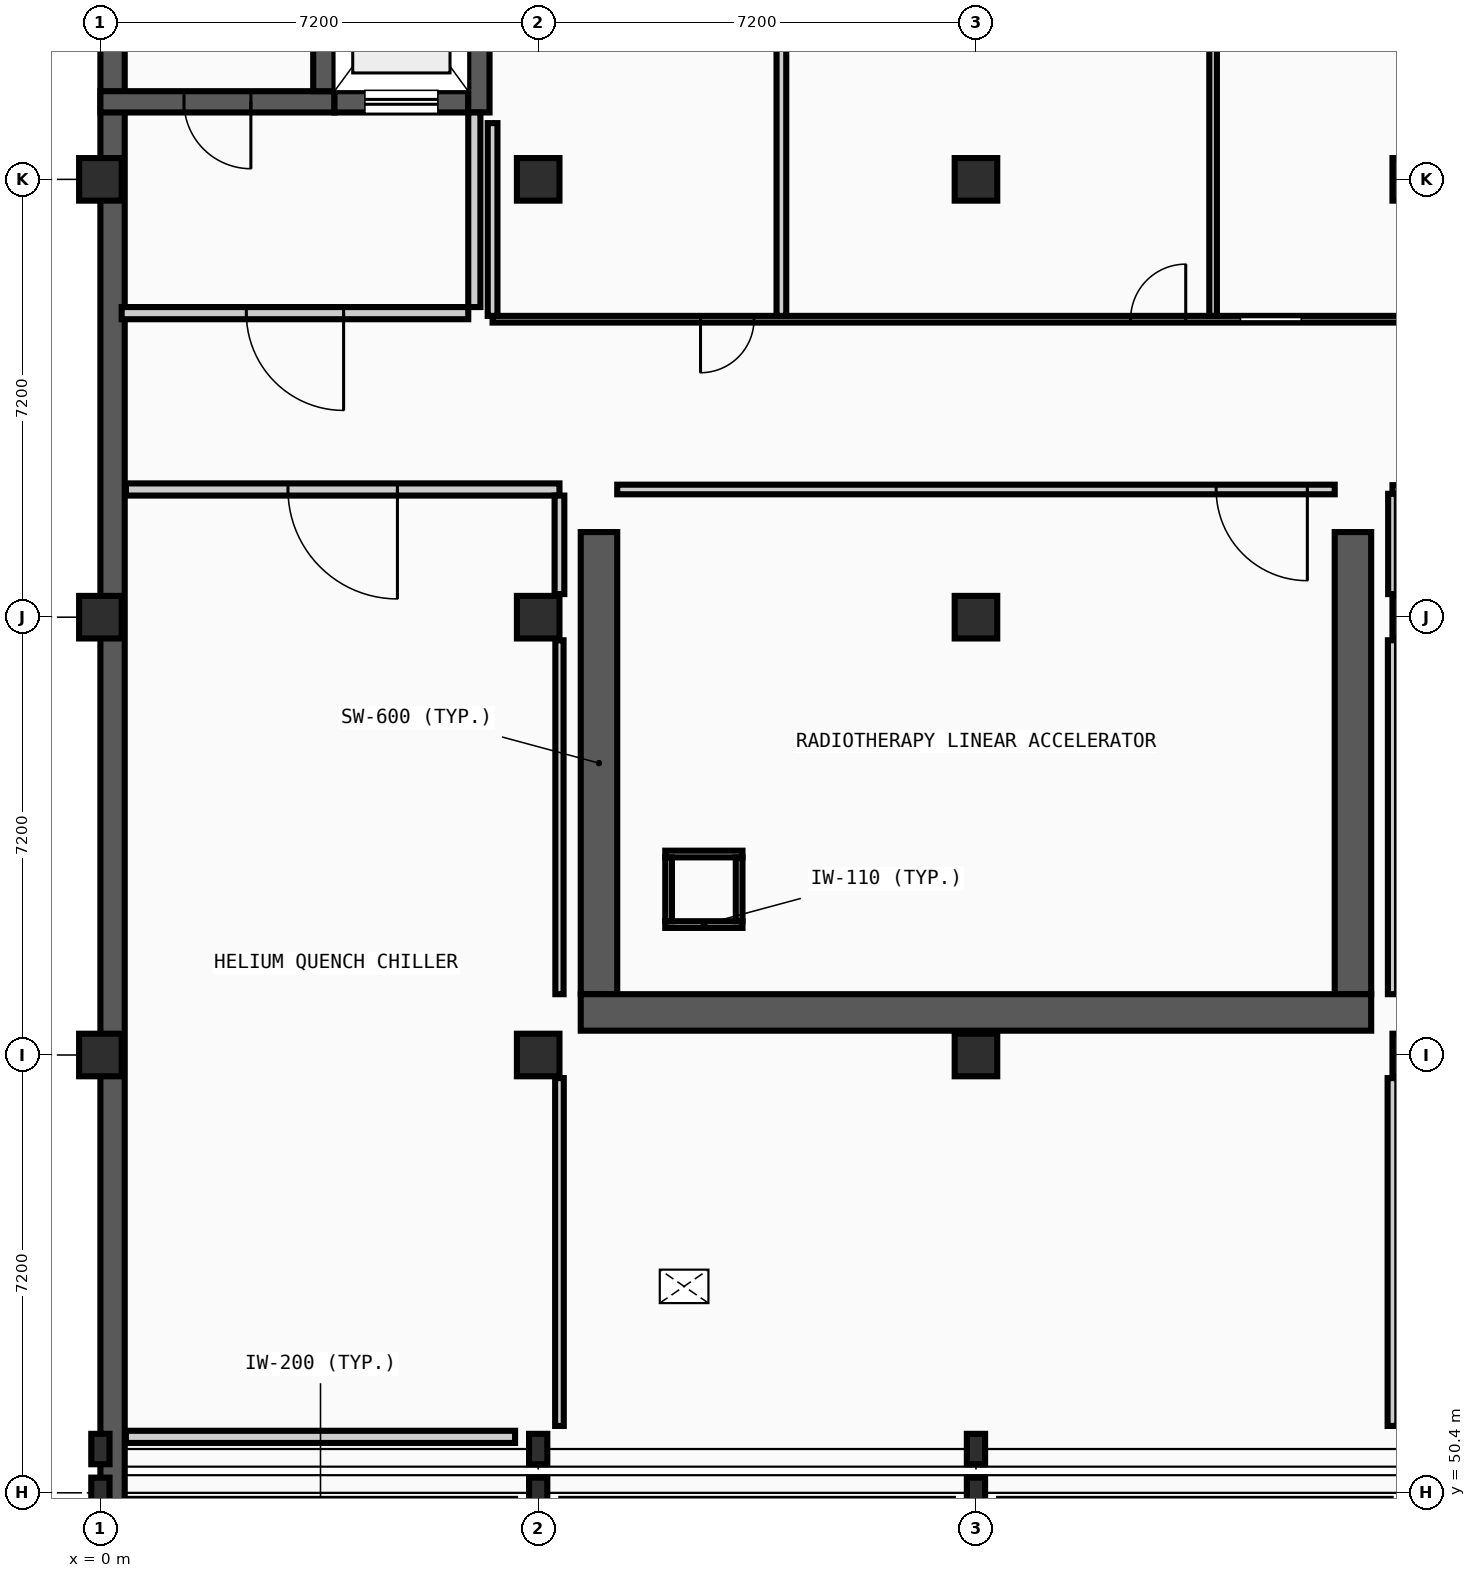
"""IFC4 building model, lengths in metres.
Left out: names, types, materials, properties, quantities, classifications, styles, units other than length and angle.
Written with IfcOpenShell. Run it as: python <this file> out.ifc"""

import sys

from ifc_helpers import new_model, si_unit, direction, frame, frame_2d, origin, origin_2d, place, context, subcontext, project, spatial, rectangle, i_section, extrude, element, fill, save


model = new_model("IFC4")
c1 = context("Model", 3, precision=1e-05, world=origin(), true_north=direction((0.0, 1.0)))
c2 = subcontext(c1, "Body", "Model", "MODEL_VIEW")
j1 = project(units=[si_unit("LENGTHUNIT", "METRE"), si_unit("PLANEANGLEUNIT", "RADIAN")], contexts=[c1])
p1 = place(None, origin())
s1 = spatial("IfcSite", under=j1, at=p1, CompositionType="ELEMENT")
p2 = place(p1, origin())
s2 = spatial("IfcBuilding", under=s1, at=p2, CompositionType="ELEMENT")
p3 = place(p2, frame((0.0, 0.0, -4.8)))
s3 = spatial("IfcBuildingStorey", under=s2, at=p3, CompositionType="ELEMENT", Elevation=-4.8)
for number, where, z_axis, x_axis in (
    (1, (0.0, 50.4, 0.0), (0.0, 0.0, 1.0), (1.0, 0.0, 0.0)),
    (2, (0.0, 51.12, 0.0), (0.0, 0.0, 1.0), (1.0, 0.0, 0.0)),
):
    element("IfcColumn", number, at=place(p3, frame(where, z_axis=z_axis, x_axis=x_axis)), inside=s3, PredefinedType="COLUMN", context=c2, shape_type="SweptSolid", body=[
        extrude(i_section(OverallWidth=0.3, OverallDepth=0.5, WebThickness=0.014, FlangeThickness=0.028, FilletRadius=0.027, at=origin_2d()), origin(), (0.0, 0.0, 1.0), 4.8),
    ])
for number, where, z_axis, x_axis in (
    (3, (0.0, 57.6, 0.0), (0.0, 0.0, 1.0), (1.0, 0.0, 0.0)),
    (4, (0.0, 64.8, 0.0), (0.0, 0.0, 1.0), (1.0, 0.0, 0.0)),
    (5, (0.0, 72.0, 0.0), (0.0, 0.0, 1.0), (1.0, 0.0, 0.0)),
):
    element("IfcColumn", number, at=place(p3, frame(where, z_axis=z_axis, x_axis=x_axis)), inside=s3, PredefinedType="COLUMN", context=c2, shape_type="SweptSolid", body=[
        extrude(rectangle(XDim=0.7, YDim=0.7, at=origin_2d()), origin(), (0.0, 0.0, 1.0), 4.8),
    ])
for number, where, z_axis, x_axis in (
    (6, (7.2, 50.4, 0.0), (0.0, 0.0, 1.0), (1.0, 0.0, 0.0)),
    (7, (7.2, 51.12, 0.0), (0.0, 0.0, 1.0), (1.0, 0.0, 0.0)),
):
    element("IfcColumn", number, at=place(p3, frame(where, z_axis=z_axis, x_axis=x_axis)), inside=s3, PredefinedType="COLUMN", context=c2, shape_type="SweptSolid", body=[
        extrude(i_section(OverallWidth=0.3, OverallDepth=0.5, WebThickness=0.014, FlangeThickness=0.028, FilletRadius=0.027, at=origin_2d()), origin(), (0.0, 0.0, 1.0), 4.8),
    ])
for number, where, z_axis, x_axis in (
    (8, (7.2, 57.6, 0.0), (0.0, 0.0, 1.0), (1.0, 0.0, 0.0)),
    (9, (7.2, 64.8, 0.0), (0.0, 0.0, 1.0), (1.0, 0.0, 0.0)),
    (10, (7.2, 72.0, 0.0), (0.0, 0.0, 1.0), (1.0, 0.0, 0.0)),
):
    element("IfcColumn", number, at=place(p3, frame(where, z_axis=z_axis, x_axis=x_axis)), inside=s3, PredefinedType="COLUMN", context=c2, shape_type="SweptSolid", body=[
        extrude(rectangle(XDim=0.7, YDim=0.7, at=origin_2d()), origin(), (0.0, 0.0, 1.0), 4.8),
    ])
for number, where, z_axis, x_axis in (
    (11, (14.4, 50.4, 0.0), (0.0, 0.0, 1.0), (1.0, 0.0, 0.0)),
    (12, (14.4, 51.12, 0.0), (0.0, 0.0, 1.0), (1.0, 0.0, 0.0)),
):
    element("IfcColumn", number, at=place(p3, frame(where, z_axis=z_axis, x_axis=x_axis)), inside=s3, PredefinedType="COLUMN", context=c2, shape_type="SweptSolid", body=[
        extrude(i_section(OverallWidth=0.3, OverallDepth=0.5, WebThickness=0.014, FlangeThickness=0.028, FilletRadius=0.027, at=origin_2d()), origin(), (0.0, 0.0, 1.0), 4.8),
    ])
for number, where, z_axis, x_axis in (
    (13, (14.4, 57.6, 0.0), (0.0, 0.0, 1.0), (1.0, 0.0, 0.0)),
    (14, (14.4, 64.8, 0.0), (0.0, 0.0, 1.0), (1.0, 0.0, 0.0)),
    (15, (14.4, 72.0, 0.0), (0.0, 0.0, 1.0), (1.0, 0.0, 0.0)),
    (16, (21.6, 57.6, 0.0), (0.0, 0.0, 1.0), (1.0, 0.0, 0.0)),
    (17, (21.6, 64.8, 0.0), (0.0, 0.0, 1.0), (1.0, 0.0, 0.0)),
    (18, (21.6, 72.0, 0.0), (0.0, 0.0, 1.0), (1.0, 0.0, 0.0)),
):
    element("IfcColumn", number, at=place(p3, frame(where, z_axis=z_axis, x_axis=x_axis)), inside=s3, PredefinedType="COLUMN", context=c2, shape_type="SweptSolid", body=[
        extrude(rectangle(XDim=0.7, YDim=0.7, at=origin_2d()), origin(), (0.0, 0.0, 1.0), 4.8),
    ])
p4 = place(p3, frame((0.2, 81.6, 0.0), z_axis=(0.0, 0.0, 1.0), x_axis=(0.0, -1.0, 0.0)))
e19 = element("IfcWall", 19, at=p4, inside=s3, PredefinedType="USERDEFINED", context=c2, shape_type="SweptSolid", body=[
    extrude(rectangle(XDim=81.2, YDim=0.4, at=frame_2d((40.6, 0.0))), origin(), (0.0, 0.0, 1.0), 4.545),
])
for number, where, z_axis, x_axis in (
    (20, (8.2, 58.6, 0.0), (0.0, 0.0, 1.0), (0.0, 1.0, 0.0)),
    (21, (20.6, 58.6, 0.0), (0.0, 0.0, 1.0), (0.0, 1.0, 0.0)),
):
    element("IfcWall", number, at=place(p3, frame(where, z_axis=z_axis, x_axis=x_axis)), inside=s3, PredefinedType="SHEAR", context=c2, shape_type="SweptSolid", body=[
        extrude(rectangle(XDim=7.6, YDim=0.6, at=frame_2d((3.8, 0.0))), origin(), (0.0, 0.0, 1.0), 4.5),
    ])
p5 = place(p3, frame((7.9, 58.3, 0.0), z_axis=(0.0, 0.0, 1.0), x_axis=(1.0, 0.0, 0.0)))
e22 = element("IfcWall", 22, at=p5, inside=s3, PredefinedType="SHEAR", context=c2, shape_type="SweptSolid", body=[
    extrude(rectangle(XDim=13.0, YDim=0.6, at=frame_2d((6.5, 0.0))), origin(), (0.0, 0.0, 1.0), 4.5),
])
p6 = place(p3, frame((0.0, 73.275, 0.0), z_axis=(0.0, 0.0, 1.0), x_axis=(1.0, 0.0, 0.0)))
e23 = element("IfcWall", 23, at=p6, inside=s3, PredefinedType="SHEAR", context=c2, shape_type="SweptSolid", body=[
    extrude(rectangle(XDim=3.85, YDim=0.35, at=frame_2d((1.925, 0.0))), origin(), (0.0, 0.0, 1.0), 4.545),
])
p7 = place(p6, frame((1.375, 0.0, 0.0)))
e24 = element("IfcOpeningElement", 24, at=p7, cuts=e23, PredefinedType="OPENING", context=c2, shape_type="SweptSolid", body=[
    extrude(rectangle(XDim=1.1, YDim=2.15, at=frame_2d((0.55, 1.075))), frame((0.0, 0.185, 0.0), z_axis=(0.0, -1.0, 0.0), x_axis=(1.0, 0.0, 0.0)), (0.0, 0.0, 1.0), 0.37),
])
p8 = place(p3, frame((3.675, 73.45, 0.0), z_axis=(0.0, 0.0, 1.0), x_axis=(0.0, 1.0, 0.0)))
e25 = element("IfcWall", 25, at=p8, inside=s3, PredefinedType="SHEAR", context=c2, shape_type="SweptSolid", body=[
    extrude(rectangle(XDim=7.8, YDim=0.35, at=frame_2d((3.9, 0.0))), origin(), (0.0, 0.0, 1.0), 4.545),
])
p9 = place(p3, frame((3.85, 73.275, 0.0), z_axis=(0.0, 0.0, 1.0), x_axis=(1.0, 0.0, 0.0)))
e26 = element("IfcWall", 26, at=p9, inside=s3, PredefinedType="SHEAR", context=c2, shape_type="SweptSolid", body=[
    extrude(rectangle(XDim=2.2, YDim=0.35, at=frame_2d((1.1, 0.0))), origin(), (0.0, 0.0, 1.0), 4.545),
])
p10 = place(p9, frame((0.5, 0.0, 0.0)))
e27 = element("IfcOpeningElement", 27, at=p10, cuts=e26, PredefinedType="OPENING", context=c2, shape_type="SweptSolid", body=[
    extrude(rectangle(XDim=1.2, YDim=2.2, at=frame_2d((0.6, 1.1))), frame((0.0, 0.185, 0.0), z_axis=(0.0, -1.0, 0.0), x_axis=(1.0, 0.0, 0.0)), (0.0, 0.0, 1.0), 0.37),
])
p11 = place(p3, frame((6.225, 73.1, 0.0), z_axis=(0.0, 0.0, 1.0), x_axis=(0.0, 1.0, 0.0)))
e28 = element("IfcWall", 28, at=p11, inside=s3, PredefinedType="SHEAR", context=c2, shape_type="SweptSolid", body=[
    extrude(rectangle(XDim=3.7, YDim=0.35, at=frame_2d((1.85, 0.0))), origin(), (0.0, 0.0, 1.0), 4.545),
])
p12 = place(p3, frame((0.35, 69.8, 0.0), z_axis=(0.0, 0.0, 1.0), x_axis=(1.0, 0.0, 0.0)))
e29 = element("IfcWall", 29, at=p12, inside=s3, PredefinedType="PARTITIONING", context=c2, shape_type="SweptSolid", body=[
    extrude(rectangle(XDim=5.7, YDim=0.2, at=frame_2d((2.85, 0.0))), origin(), (0.0, 0.0, 1.0), 4.545),
])
p13 = place(p12, frame((2.05, 0.0, 0.0)))
e30 = element("IfcOpeningElement", 30, at=p13, cuts=e29, PredefinedType="OPENING", context=c2, shape_type="SweptSolid", body=[
    extrude(rectangle(XDim=1.6, YDim=2.2, at=frame_2d((0.8, 1.1))), frame((0.0, 0.11, 0.0), z_axis=(0.0, -1.0, 0.0), x_axis=(1.0, 0.0, 0.0)), (0.0, 0.0, 1.0), 0.22),
])
p14 = place(p3, frame((6.15, 69.9, 0.0), z_axis=(0.0, 0.0, 1.0), x_axis=(0.0, 1.0, 0.0)))
e31 = element("IfcWall", 31, at=p14, inside=s3, PredefinedType="PARTITIONING", context=c2, shape_type="SweptSolid", body=[
    extrude(rectangle(XDim=3.2, YDim=0.2, at=frame_2d((1.6, 0.0))), origin(), (0.0, 0.0, 1.0), 4.545),
])
for number, where, z_axis, x_axis in (
    (32, (9.29, 59.745, 0.0), (0.0, 0.0, 1.0), (1.0, 0.0, 0.0)),
    (33, (9.29, 60.905, 0.0), (0.0, 0.0, 1.0), (1.0, 0.0, 0.0)),
):
    element("IfcWall", number, at=place(p3, frame(where, z_axis=z_axis, x_axis=x_axis)), inside=s3, PredefinedType="PARTITIONING", context=c2, shape_type="SweptSolid", body=[
        extrude(rectangle(XDim=1.27, YDim=0.11, at=frame_2d((0.635, 0.0))), origin(), (0.0, 0.0, 1.0), 4.54),
    ])
for number, where, z_axis, x_axis in (
    (34, (9.345, 59.8, 0.0), (0.0, 0.0, 1.0), (0.0, 1.0, 0.0)),
    (35, (10.505, 59.8, 0.0), (0.0, 0.0, 1.0), (0.0, 1.0, 0.0)),
):
    element("IfcWall", number, at=place(p3, frame(where, z_axis=z_axis, x_axis=x_axis)), inside=s3, PredefinedType="PARTITIONING", context=c2, shape_type="SweptSolid", body=[
        extrude(rectangle(XDim=1.05, YDim=0.11, at=frame_2d((0.525, 0.0))), origin(), (0.0, 0.0, 1.0), 4.54),
    ])
p15 = place(p3, frame((0.42, 51.32, 0.0), z_axis=(0.0, 0.0, 1.0), x_axis=(1.0, 0.0, 0.0)))
e36 = element("IfcWall", 36, at=p15, inside=s3, PredefinedType="PARTITIONING", context=c2, shape_type="SweptSolid", body=[
    extrude(rectangle(XDim=6.4, YDim=0.2, at=frame_2d((3.2, 0.0))), origin(), (0.0, 0.0, 1.0), 4.085),
])
p16 = place(p3, frame((0.42, 66.9, 0.0), z_axis=(0.0, 0.0, 1.0), x_axis=(1.0, 0.0, 0.0)))
e37 = element("IfcWall", 37, at=p16, inside=s3, PredefinedType="PARTITIONING", context=c2, shape_type="SweptSolid", body=[
    extrude(rectangle(XDim=7.13, YDim=0.2, at=frame_2d((3.565, 0.0))), origin(), (0.0, 0.0, 1.0), 4.545),
])
p17 = place(p16, frame((2.665, 0.0, 0.0)))
e38 = element("IfcOpeningElement", 38, at=p17, cuts=e37, PredefinedType="OPENING", context=c2, shape_type="SweptSolid", body=[
    extrude(rectangle(XDim=1.8, YDim=2.3, at=frame_2d((0.9, 1.15))), frame((0.0, 0.11, 0.0), z_axis=(0.0, -1.0, 0.0), x_axis=(1.0, 0.0, 0.0)), (0.0, 0.0, 1.0), 0.22),
])
p18 = place(p3, frame((8.5, 66.9, 0.0), z_axis=(0.0, 0.0, 1.0), x_axis=(1.0, 0.0, 0.0)))
e39 = element("IfcWall", 39, at=p18, inside=s3, PredefinedType="PARTITIONING", context=c2, shape_type="SweptSolid", body=[
    extrude(rectangle(XDim=11.8, YDim=0.158, at=frame_2d((5.9, 0.0))), origin(), (0.0, 0.0, 1.0), 4.545),
])
p19 = place(p18, frame((9.85, 0.0, 0.0)))
e40 = element("IfcOpeningElement", 40, at=p19, cuts=e39, PredefinedType="OPENING", context=c2, shape_type="SweptSolid", body=[
    extrude(rectangle(XDim=1.5, YDim=2.2, at=frame_2d((0.75, 1.1))), frame((0.0, 0.089, 0.0), z_axis=(0.0, -1.0, 0.0), x_axis=(1.0, 0.0, 0.0)), (0.0, 0.0, 1.0), 0.178),
])
p20 = place(p3, frame((21.25, 66.9, 0.0), z_axis=(0.0, 0.0, 1.0), x_axis=(1.0, 0.0, 0.0)))
e41 = element("IfcWall", 41, at=p20, inside=s3, PredefinedType="PARTITIONING", context=c2, shape_type="SweptSolid", body=[
    extrude(rectangle(XDim=7.35, YDim=0.142, at=frame_2d((3.675, 0.0))), origin(), (0.0, 0.0, 1.0), 4.545),
])
p21 = place(p20, frame((3.209, 0.0, 0.0)))
e42 = element("IfcOpeningElement", 42, at=p21, cuts=e41, PredefinedType="OPENING", context=c2, shape_type="SweptSolid", body=[
    extrude(rectangle(XDim=0.932, YDim=2.068, at=frame_2d((0.466, 1.034))), frame((0.0, 0.081, 0.0), z_axis=(0.0, -1.0, 0.0), x_axis=(1.0, 0.0, 0.0)), (0.0, 0.0, 1.0), 0.162),
])
p22 = place(p3, frame((6.45, 69.7, 0.0), z_axis=(0.0, 0.0, 1.0), x_axis=(1.0, 0.0, 0.0)))
e43 = element("IfcWall", 43, at=p22, inside=s3, PredefinedType="PARTITIONING", context=c2, shape_type="SweptSolid", body=[
    extrude(rectangle(XDim=16.18, YDim=0.11, at=frame_2d((8.09, 0.0))), origin(), (0.0, 0.0, 1.0), 4.545),
])
p23 = place(p22, frame((12.3, 0.0, 0.0)))
e44 = element("IfcOpeningElement", 44, at=p23, cuts=e43, PredefinedType="OPENING", context=c2, shape_type="SweptSolid", body=[
    extrude(rectangle(XDim=1.0, YDim=2.1, at=frame_2d((0.5, 1.05))), frame((0.0, 0.065, 0.0), z_axis=(0.0, -1.0, 0.0), x_axis=(1.0, 0.0, 0.0)), (0.0, 0.0, 1.0), 0.13),
])
p24 = place(p22, frame((3.42, 0.0, 0.0)))
e45 = element("IfcOpeningElement", 45, at=p24, cuts=e43, PredefinedType="OPENING", context=c2, shape_type="SweptSolid", body=[
    extrude(rectangle(XDim=0.88, YDim=2.068, at=frame_2d((0.44, 1.034))), frame((0.0, 0.065, 0.0), z_axis=(0.0, -1.0, 0.0), x_axis=(1.0, 0.0, 0.0)), (0.0, 0.0, 1.0), 0.13),
])
p25 = place(p22, frame((10.494, 0.0, 0.0)))
e46 = element("IfcOpeningElement", 46, at=p25, cuts=e43, PredefinedType="OPENING", context=c2, shape_type="SweptSolid", body=[
    extrude(rectangle(XDim=0.906, YDim=2.068, at=frame_2d((0.453, 1.034))), frame((0.0, 0.065, 0.0), z_axis=(0.0, -1.0, 0.0), x_axis=(1.0, 0.0, 0.0)), (0.0, 0.0, 1.0), 0.13),
])
p26 = place(p3, frame((6.45, 69.755, 0.0), z_axis=(0.0, 0.0, 1.0), x_axis=(0.0, 1.0, 0.0)))
e47 = element("IfcWall", 47, at=p26, inside=s3, PredefinedType="PARTITIONING", context=c2, shape_type="SweptSolid", body=[
    extrude(rectangle(XDim=3.17, YDim=0.16, at=frame_2d((1.585, 0.0))), origin(), (0.0, 0.0, 1.0), 4.545),
])
p27 = place(p3, frame((7.55, 51.5, 0.0), z_axis=(0.0, 0.0, 1.0), x_axis=(0.0, 1.0, 0.0)))
e48 = element("IfcWall", 48, at=p27, inside=s3, PredefinedType="PARTITIONING", context=c2, shape_type="SweptSolid", body=[
    extrude(rectangle(XDim=5.72, YDim=0.142, at=frame_2d((2.86, 0.0))), origin(), (0.0, 0.0, 1.0), 4.545),
])
p28 = place(p3, frame((7.55, 58.6, 0.0), z_axis=(0.0, 0.0, 1.0), x_axis=(0.0, 1.0, 0.0)))
e49 = element("IfcWall", 49, at=p28, inside=s3, PredefinedType="PARTITIONING", context=c2, shape_type="SweptSolid", body=[
    extrude(rectangle(XDim=5.82, YDim=0.135, at=frame_2d((2.91, 0.0))), origin(), (0.0, 0.0, 1.0), 4.545),
])
p29 = place(p3, frame((7.55, 65.18, 0.0), z_axis=(0.0, 0.0, 1.0), x_axis=(0.0, 1.0, 0.0)))
e50 = element("IfcWall", 50, at=p29, inside=s3, PredefinedType="PARTITIONING", context=c2, shape_type="SweptSolid", body=[
    extrude(rectangle(XDim=1.62, YDim=0.16, at=frame_2d((0.81, 0.0))), origin(), (0.0, 0.0, 1.0), 4.545),
])
p30 = place(p3, frame((11.2, 69.755, 0.0), z_axis=(0.0, 0.0, 1.0), x_axis=(0.0, 1.0, 0.0)))
e51 = element("IfcWall", 51, at=p30, inside=s3, PredefinedType="PARTITIONING", context=c2, shape_type="SweptSolid", body=[
    extrude(rectangle(XDim=11.845, YDim=0.16, at=frame_2d((5.923, 0.0))), origin(), (0.0, 0.0, 1.0), 4.545),
])
p31 = place(p3, frame((18.3, 69.755, 0.0), z_axis=(0.0, 0.0, 1.0), x_axis=(0.0, 1.0, 0.0)))
e52 = element("IfcWall", 52, at=p31, inside=s3, PredefinedType="PARTITIONING", context=c2, shape_type="SweptSolid", body=[
    extrude(rectangle(XDim=11.845, YDim=0.125, at=frame_2d((5.923, 0.0))), origin(), (0.0, 0.0, 1.0), 4.545),
])
p32 = place(p3, frame((21.25, 51.5, 0.0), z_axis=(0.0, 0.0, 1.0), x_axis=(0.0, 1.0, 0.0)))
e53 = element("IfcWall", 53, at=p32, inside=s3, PredefinedType="PARTITIONING", context=c2, shape_type="SweptSolid", body=[
    extrude(rectangle(XDim=5.72, YDim=0.16, at=frame_2d((2.86, 0.0))), origin(), (0.0, 0.0, 1.0), 4.545),
])
p33 = place(p3, frame((21.25, 58.6, 0.0), z_axis=(0.0, 0.0, 1.0), x_axis=(0.0, 1.0, 0.0)))
e54 = element("IfcWall", 54, at=p33, inside=s3, PredefinedType="PARTITIONING", context=c2, shape_type="SweptSolid", body=[
    extrude(rectangle(XDim=5.82, YDim=0.15, at=frame_2d((2.91, 0.0))), origin(), (0.0, 0.0, 1.0), 4.545),
])
p34 = place(p3, frame((21.25, 65.18, 0.0), z_axis=(0.0, 0.0, 1.0), x_axis=(0.0, 1.0, 0.0)))
e55 = element("IfcWall", 55, at=p34, inside=s3, PredefinedType="PARTITIONING", context=c2, shape_type="SweptSolid", body=[
    extrude(rectangle(XDim=1.649, YDim=0.142, at=frame_2d((0.825, 0.0))), origin(), (0.0, 0.0, 1.0), 4.545),
])
p35 = place(p7, origin())
e56 = element("IfcDoor", 56, at=p35, inside=s3, OperationType="SINGLE_SWING_RIGHT", PredefinedType="DOOR", context=c2, shape_type="SweptSolid", body=[
    extrude(rectangle(XDim=1.1, YDim=2.15, at=frame_2d((0.55, 1.075))), frame((0.0, 0.025, 0.0), z_axis=(0.0, -1.0, 0.0), x_axis=(1.0, 0.0, 0.0)), (0.0, 0.0, 1.0), 0.05),
])
fill(e24, e56)
p36 = place(p10, origin())
e57 = element("IfcDoor", 57, at=p36, inside=s3, OperationType="SLIDING_TO_RIGHT", PredefinedType="DOOR", context=c2, shape_type="SweptSolid", body=[
    extrude(rectangle(XDim=1.2, YDim=2.2, at=frame_2d((0.6, 1.1))), frame((0.0, 0.025, 0.0), z_axis=(0.0, -1.0, 0.0), x_axis=(1.0, 0.0, 0.0)), (0.0, 0.0, 1.0), 0.05),
])
fill(e27, e57)
p37 = place(p13, origin())
e58 = element("IfcDoor", 58, at=p37, inside=s3, OperationType="DOUBLE_DOOR_SINGLE_SWING", PredefinedType="DOOR", context=c2, shape_type="SweptSolid", body=[
    extrude(rectangle(XDim=1.6, YDim=2.2, at=frame_2d((0.8, 1.1))), frame((0.0, 0.025, 0.0), z_axis=(0.0, -1.0, 0.0), x_axis=(1.0, 0.0, 0.0)), (0.0, 0.0, 1.0), 0.05),
])
fill(e30, e58)
p38 = place(p19, origin())
e59 = element("IfcDoor", 59, at=p38, inside=s3, OperationType="DOUBLE_DOOR_SINGLE_SWING", PredefinedType="DOOR", context=c2, shape_type="SweptSolid", body=[
    extrude(rectangle(XDim=1.5, YDim=2.2, at=frame_2d((0.75, 1.1))), frame((0.0, 0.025, 0.0), z_axis=(0.0, -1.0, 0.0), x_axis=(1.0, 0.0, 0.0)), (0.0, 0.0, 1.0), 0.05),
])
fill(e40, e59)
p39 = place(p23, frame((1.0, 0.0, 0.0), z_axis=(0.0, 0.0, 1.0), x_axis=(-1.0, 0.0, 0.0)))
e60 = element("IfcDoor", 60, at=p39, inside=s3, OperationType="SLIDING_TO_LEFT", PredefinedType="DOOR", context=c2, shape_type="SweptSolid", body=[
    extrude(rectangle(XDim=1.0, YDim=2.1, at=frame_2d((0.5, 1.05))), frame((0.0, 0.025, 0.0), z_axis=(0.0, -1.0, 0.0), x_axis=(1.0, 0.0, 0.0)), (0.0, 0.0, 1.0), 0.05),
])
fill(e44, e60)
p40 = place(p24, frame((0.88, 0.0, 0.0), z_axis=(0.0, 0.0, 1.0), x_axis=(-1.0, 0.0, 0.0)))
e61 = element("IfcDoor", 61, at=p40, inside=s3, OperationType="SINGLE_SWING_LEFT", PredefinedType="DOOR", context=c2, shape_type="SweptSolid", body=[
    extrude(rectangle(XDim=0.88, YDim=2.068, at=frame_2d((0.44, 1.034))), frame((0.0, 0.025, 0.0), z_axis=(0.0, -1.0, 0.0), x_axis=(1.0, 0.0, 0.0)), (0.0, 0.0, 1.0), 0.05),
])
fill(e45, e61)
p41 = place(p25, frame((0.906, 0.0, 0.0), z_axis=(0.0, 0.0, 1.0), x_axis=(-1.0, 0.0, 0.0)))
e62 = element("IfcDoor", 62, at=p41, inside=s3, OperationType="SINGLE_SWING_RIGHT", PredefinedType="DOOR", context=c2, shape_type="SweptSolid", body=[
    extrude(rectangle(XDim=0.906, YDim=2.068, at=frame_2d((0.453, 1.034))), frame((0.0, 0.025, 0.0), z_axis=(0.0, -1.0, 0.0), x_axis=(1.0, 0.0, 0.0)), (0.0, 0.0, 1.0), 0.05),
])
fill(e46, e62)
p42 = place(p17, origin())
e63 = element("IfcDoor", 63, at=p42, inside=s3, OperationType="DOUBLE_DOOR_SINGLE_SWING", PredefinedType="DOOR", context=c2, shape_type="SweptSolid", body=[
    extrude(rectangle(XDim=1.8, YDim=2.3, at=frame_2d((0.9, 1.15))), frame((0.0, 0.025, 0.0), z_axis=(0.0, -1.0, 0.0), x_axis=(1.0, 0.0, 0.0)), (0.0, 0.0, 1.0), 0.05),
])
fill(e38, e63)
save(model, sys.argv[1])
